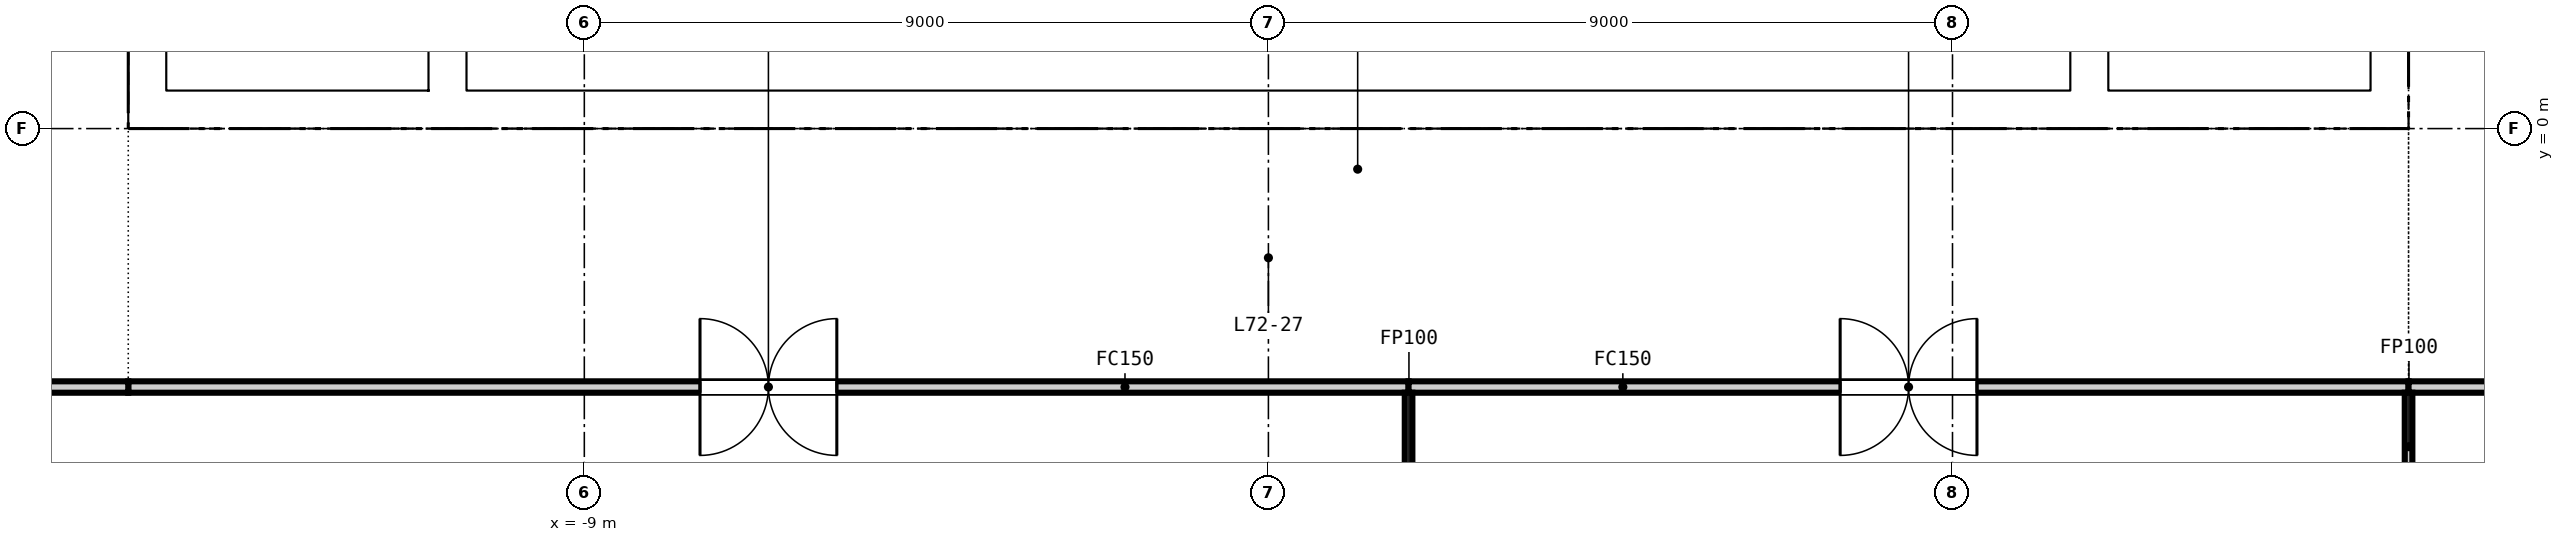
"""IFC4 building model, lengths in metres.
Left out: names, types, materials, properties, quantities, classifications, styles, units other than length and angle.
Written with IfcOpenShell. Run it as: python <this file> out.ifc"""

import sys

from ifc_helpers import new_model, si_unit, direction, frame, frame_2d, origin, place, context, subcontext, project, spatial, rectangle, extrude, element, fill, save


model = new_model("IFC4")
c1 = context("Model", 3, precision=1e-05, world=origin(), true_north=direction((0.0, 1.0)))
c2 = subcontext(c1, "Body", "Model", "MODEL_VIEW")
j1 = project(units=[si_unit("LENGTHUNIT", "METRE"), si_unit("PLANEANGLEUNIT", "RADIAN")], contexts=[c1])
p1 = place(None, origin())
s1 = spatial("IfcSite", under=j1, at=p1, CompositionType="ELEMENT")
p2 = place(p1, origin())
s2 = spatial("IfcBuilding", under=s1, at=p2, CompositionType="ELEMENT")
p3 = place(p2, frame((0.0, 0.0, 282.85)))
s3 = spatial("IfcBuildingStorey", under=s2, at=p3, CompositionType="ELEMENT", Elevation=282.85)
p4 = place(p3, frame((-15.0, 0.25, -0.15), z_axis=(0.0, 0.0, 1.0), x_axis=(1.0, 0.0, 0.0)))
e1 = element("IfcWall", 1, at=p4, inside=s3, PredefinedType="SOLIDWALL", context=c2, shape_type="SweptSolid", body=[
    extrude(rectangle(XDim=30.0, YDim=0.5, at=frame_2d((15.0, 0.0))), origin(), (0.0, 0.0, 1.0), 3.65),
])
p5 = place(p4, frame((5.8, 0.0, 0.15)))
e2 = element("IfcOpeningElement", 2, at=p5, cuts=e1, PredefinedType="OPENING", context=c2, shape_type="SweptSolid", body=[
    extrude(rectangle(XDim=2.4, YDim=2.4, at=frame_2d((1.2, 1.2))), frame((0.0, 0.26, 0.0), z_axis=(0.0, -1.0, 0.0), x_axis=(1.0, 0.0, 0.0)), (0.0, 0.0, 1.0), 0.52),
])
p6 = place(p4, frame((13.8, 0.0, 0.15)))
e3 = element("IfcOpeningElement", 3, at=p6, cuts=e1, PredefinedType="OPENING", context=c2, shape_type="SweptSolid", body=[
    extrude(rectangle(XDim=2.4, YDim=2.4, at=frame_2d((1.2, 1.2))), frame((0.0, 0.26, 0.0), z_axis=(0.0, -1.0, 0.0), x_axis=(1.0, 0.0, 0.0)), (0.0, 0.0, 1.0), 0.52),
])
p7 = place(p4, frame((21.8, 0.0, 0.15)))
e4 = element("IfcOpeningElement", 4, at=p7, cuts=e1, PredefinedType="OPENING", context=c2, shape_type="SweptSolid", body=[
    extrude(rectangle(XDim=2.4, YDim=2.4, at=frame_2d((1.2, 1.2))), frame((0.0, 0.26, 0.0), z_axis=(0.0, -1.0, 0.0), x_axis=(1.0, 0.0, 0.0)), (0.0, 0.0, 1.0), 0.52),
])
p8 = place(p4, frame((1.5, 0.0, 0.15)))
e5 = element("IfcOpeningElement", 5, at=p8, cuts=e1, PredefinedType="OPENING", context=c2, shape_type="SweptSolid", body=[
    extrude(rectangle(XDim=1.2, YDim=2.1, at=frame_2d((0.6, 1.05))), frame((0.0, 0.26, 0.0), z_axis=(0.0, -1.0, 0.0), x_axis=(1.0, 0.0, 0.0)), (0.0, 0.0, 1.0), 0.52),
])
p9 = place(p4, frame((27.3, 0.0, 0.15)))
e6 = element("IfcOpeningElement", 6, at=p9, cuts=e1, PredefinedType="OPENING", context=c2, shape_type="SweptSolid", body=[
    extrude(rectangle(XDim=1.2, YDim=2.1, at=frame_2d((0.6, 1.05))), frame((0.0, 0.26, 0.0), z_axis=(0.0, -1.0, 0.0), x_axis=(1.0, 0.0, 0.0)), (0.0, 0.0, 1.0), 0.52),
])
for number, where, z_axis, x_axis in (
    (7, (-14.75, 0.5, -0.15), (0.0, 0.0, 1.0), (0.0, 1.0, 0.0)),
    (8, (14.75, 0.5, -0.15), (0.0, 0.0, 1.0), (0.0, 1.0, 0.0)),
    (9, (-10.8, 0.5, -0.15), (0.0, 0.0, 1.0), (0.0, 1.0, 0.0)),
    (10, (10.8, 0.5, -0.15), (0.0, 0.0, 1.0), (0.0, 1.0, 0.0)),
):
    element("IfcWall", number, at=place(p3, frame(where, z_axis=z_axis, x_axis=x_axis)), inside=s3, PredefinedType="SOLIDWALL", context=c2, shape_type="SweptSolid", body=[
        extrude(rectangle(XDim=14.0, YDim=0.5, at=frame_2d((7.0, 0.0))), origin(), (0.0, 0.0, 1.0), 3.65),
    ])
for number, where, z_axis, x_axis in (
    (11, (-14.25, 0.5, 0.0), (0.0, 0.0, 1.0), (0.0, 1.0, 0.0)),
    (12, (14.25, 0.5, 0.0), (0.0, 0.0, 1.0), (0.0, 1.0, 0.0)),
):
    element("IfcWall", number, at=place(p3, frame(where, z_axis=z_axis, x_axis=x_axis)), inside=s3, PredefinedType="SOLIDWALL", context=c2, shape_type="SweptSolid", body=[
        extrude(rectangle(XDim=14.0, YDim=0.5, at=frame_2d((7.0, 0.0))), origin(), (0.0, 0.0, 1.0), 3.5),
    ])
p10 = place(p3, frame((1.844, -3.4, 0.0), z_axis=(0.0, 0.0, 1.0), x_axis=(-1.0, 0.0, 0.0)))
e13 = element("IfcWall", 13, at=p10, inside=s3, PredefinedType="PARTITIONING", context=c2, shape_type="SweptSolid", body=[
    extrude(rectangle(XDim=16.844, YDim=0.15, at=frame_2d((8.422, 0.0))), origin(), (0.0, 0.0, 1.0), 2.75),
])
p11 = place(p10, frame((7.522, 0.0, 0.0)))
e14 = element("IfcOpeningElement", 14, at=p11, cuts=e13, PredefinedType="OPENING", context=c2, shape_type="SweptSolid", body=[
    extrude(rectangle(XDim=1.8, YDim=2.1, at=frame_2d((0.9, 1.05))), frame((0.0, 0.085, 0.0), z_axis=(0.0, -1.0, 0.0), x_axis=(1.0, 0.0, 0.0)), (0.0, 0.0, 1.0), 0.17),
])
p12 = place(p3, frame((15.0, -3.4, 0.0), z_axis=(0.0, 0.0, 1.0), x_axis=(-1.0, 0.0, 0.0)))
e15 = element("IfcWall", 15, at=p12, inside=s3, PredefinedType="PARTITIONING", context=c2, shape_type="SweptSolid", body=[
    extrude(rectangle(XDim=13.156, YDim=0.15, at=frame_2d((6.578, 0.0))), origin(), (0.0, 0.0, 1.0), 2.75),
])
p13 = place(p12, frame((5.678, 0.0, 0.0)))
e16 = element("IfcOpeningElement", 16, at=p13, cuts=e15, PredefinedType="OPENING", context=c2, shape_type="SweptSolid", body=[
    extrude(rectangle(XDim=1.8, YDim=2.1, at=frame_2d((0.9, 1.05))), frame((0.0, 0.085, 0.0), z_axis=(0.0, -1.0, 0.0), x_axis=(1.0, 0.0, 0.0)), (0.0, 0.0, 1.0), 0.17),
])
for number, where, z_axis, x_axis in (
    (17, (-15.0, -3.4, 0.0), (0.0, 0.0, 1.0), (-1.0, 0.0, 0.0)),
    (18, (18.0, -3.4, 0.0), (0.0, 0.0, 1.0), (-1.0, 0.0, 0.0)),
):
    element("IfcWall", number, at=place(p3, frame(where, z_axis=z_axis, x_axis=x_axis)), inside=s3, PredefinedType="PARTITIONING", context=c2, shape_type="SweptSolid", body=[
        extrude(rectangle(XDim=3.0, YDim=0.15, at=frame_2d((1.5, 0.0))), origin(), (0.0, 0.0, 1.0), 2.75),
    ])
p14 = place(p3, frame((1.844, -8.85, 0.0), z_axis=(0.0, 0.0, 1.0), x_axis=(0.0, 1.0, 0.0)))
e19 = element("IfcWall", 19, at=p14, inside=s3, PredefinedType="PARTITIONING", context=c2, shape_type="SweptSolid", body=[
    extrude(rectangle(XDim=5.375, YDim=0.1, at=frame_2d((2.688, 0.0))), origin(), (0.0, 0.0, 1.0), 2.75),
])
p15 = place(p3, frame((15.0, -4.895, 0.0), z_axis=(0.0, 0.0, 1.0), x_axis=(0.0, 1.0, 0.0)))
e20 = element("IfcWall", 20, at=p15, inside=s3, PredefinedType="PARTITIONING", context=c2, shape_type="SweptSolid", body=[
    extrude(rectangle(XDim=1.42, YDim=0.1, at=frame_2d((0.71, 0.0))), origin(), (0.0, 0.0, 1.0), 2.75),
])
p16 = place(p5, origin())
e21 = element("IfcDoor", 21, at=p16, inside=s3, OperationType="DOUBLE_DOOR_DOUBLE_SWING", PredefinedType="DOOR", context=c2, shape_type="SweptSolid", body=[
    extrude(rectangle(XDim=2.4, YDim=2.4, at=frame_2d((1.2, 1.2))), frame((0.0, 0.025, 0.0), z_axis=(0.0, -1.0, 0.0), x_axis=(1.0, 0.0, 0.0)), (0.0, 0.0, 1.0), 0.05),
])
fill(e2, e21)
p17 = place(p6, origin())
e22 = element("IfcDoor", 22, at=p17, inside=s3, OperationType="DOUBLE_DOOR_DOUBLE_SWING", PredefinedType="DOOR", context=c2, shape_type="SweptSolid", body=[
    extrude(rectangle(XDim=2.4, YDim=2.4, at=frame_2d((1.2, 1.2))), frame((0.0, 0.025, 0.0), z_axis=(0.0, -1.0, 0.0), x_axis=(1.0, 0.0, 0.0)), (0.0, 0.0, 1.0), 0.05),
])
fill(e3, e22)
p18 = place(p7, origin())
e23 = element("IfcDoor", 23, at=p18, inside=s3, OperationType="DOUBLE_DOOR_DOUBLE_SWING", PredefinedType="DOOR", context=c2, shape_type="SweptSolid", body=[
    extrude(rectangle(XDim=2.4, YDim=2.4, at=frame_2d((1.2, 1.2))), frame((0.0, 0.025, 0.0), z_axis=(0.0, -1.0, 0.0), x_axis=(1.0, 0.0, 0.0)), (0.0, 0.0, 1.0), 0.05),
])
fill(e4, e23)
p19 = place(p8, origin())
e24 = element("IfcDoor", 24, at=p19, inside=s3, OperationType="SINGLE_SWING_LEFT", PredefinedType="DOOR", context=c2, shape_type="SweptSolid", body=[
    extrude(rectangle(XDim=1.2, YDim=2.1, at=frame_2d((0.6, 1.05))), frame((0.0, 0.025, 0.0), z_axis=(0.0, -1.0, 0.0), x_axis=(1.0, 0.0, 0.0)), (0.0, 0.0, 1.0), 0.05),
])
fill(e5, e24)
p20 = place(p9, origin())
e25 = element("IfcDoor", 25, at=p20, inside=s3, OperationType="SINGLE_SWING_RIGHT", PredefinedType="DOOR", context=c2, shape_type="SweptSolid", body=[
    extrude(rectangle(XDim=1.2, YDim=2.1, at=frame_2d((0.6, 1.05))), frame((0.0, 0.025, 0.0), z_axis=(0.0, -1.0, 0.0), x_axis=(1.0, 0.0, 0.0)), (0.0, 0.0, 1.0), 0.05),
])
fill(e6, e25)
p21 = place(p11, origin())
e26 = element("IfcDoor", 26, at=p21, inside=s3, OperationType="DOUBLE_DOOR_DOUBLE_SWING", PredefinedType="DOOR", context=c2, shape_type="SweptSolid", body=[
    extrude(rectangle(XDim=1.8, YDim=2.1, at=frame_2d((0.9, 1.05))), frame((0.0, 0.025, 0.0), z_axis=(0.0, -1.0, 0.0), x_axis=(1.0, 0.0, 0.0)), (0.0, 0.0, 1.0), 0.05),
])
fill(e14, e26)
p22 = place(p13, origin())
e27 = element("IfcDoor", 27, at=p22, inside=s3, OperationType="DOUBLE_DOOR_DOUBLE_SWING", PredefinedType="DOOR", context=c2, shape_type="SweptSolid", body=[
    extrude(rectangle(XDim=1.8, YDim=2.1, at=frame_2d((0.9, 1.05))), frame((0.0, 0.025, 0.0), z_axis=(0.0, -1.0, 0.0), x_axis=(1.0, 0.0, 0.0)), (0.0, 0.0, 1.0), 0.05),
])
fill(e16, e27)
save(model, sys.argv[1])
